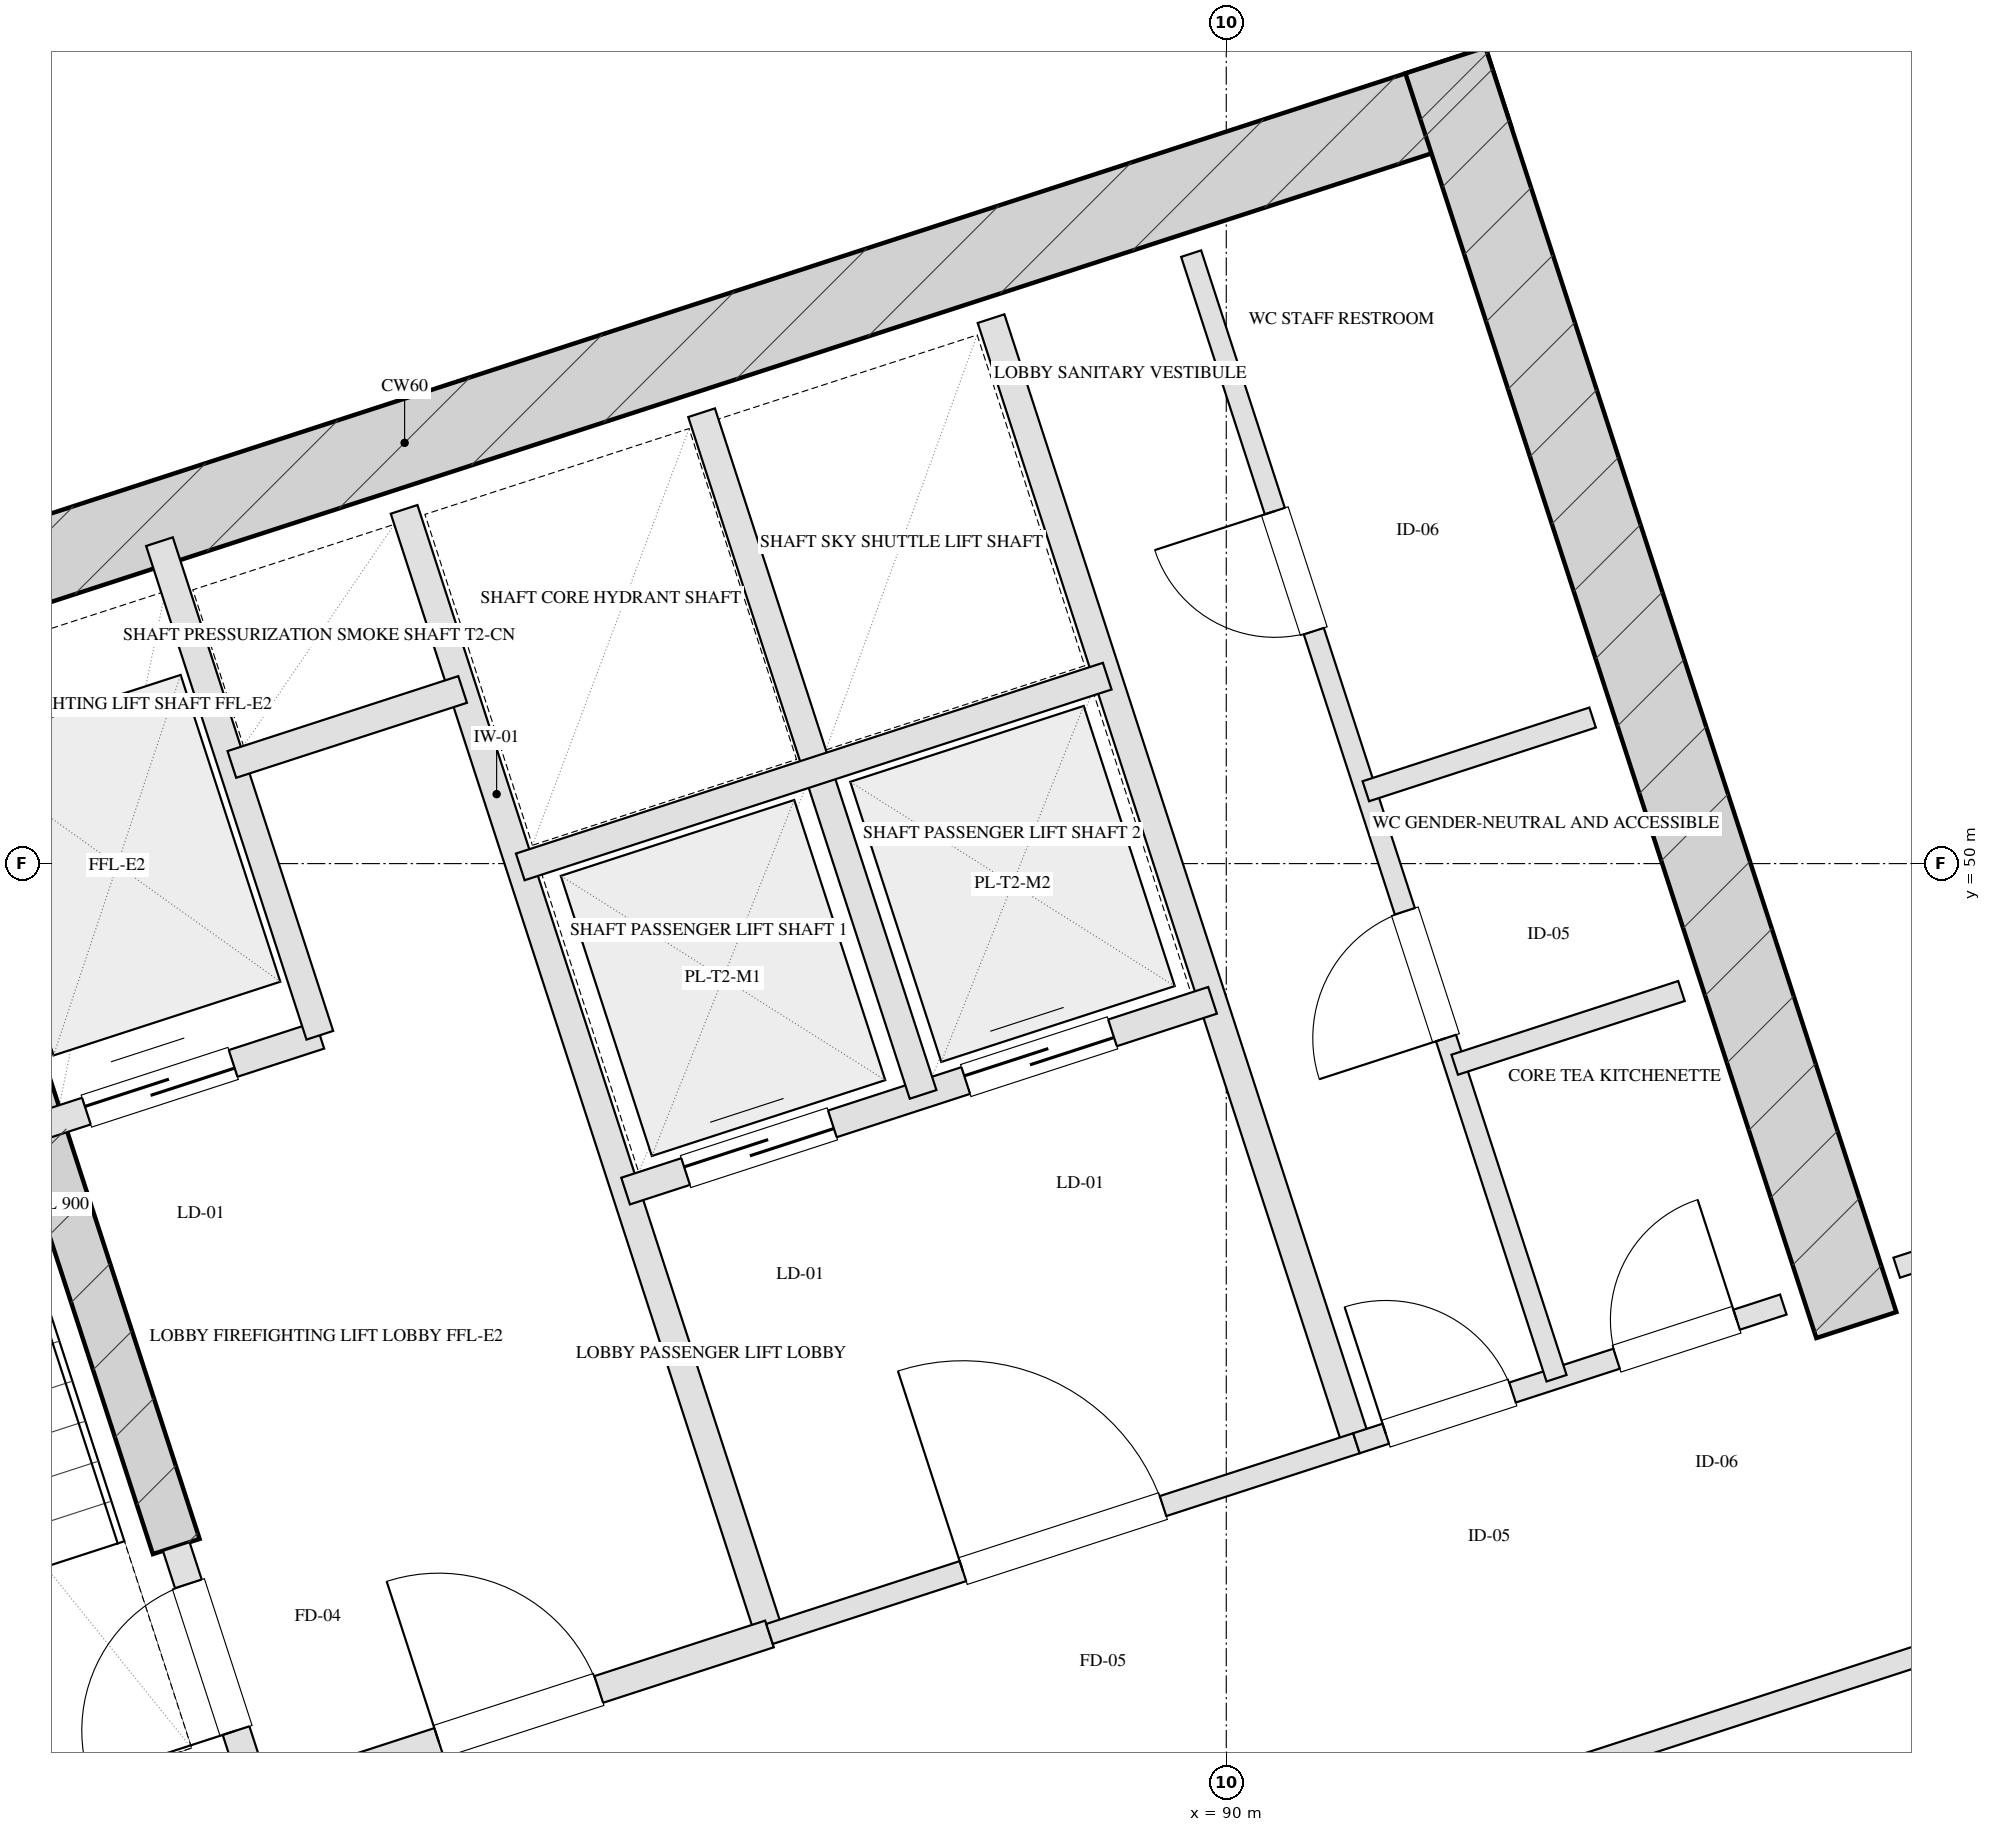
"""IFC4 building model, lengths in metres.
Left out: names, types, materials, properties, quantities, classifications, styles, units other than length and angle.
Written with IfcOpenShell. Run it as: python <this file> out.ifc"""

import sys

from ifc_helpers import new_model, si_unit, direction, frame, frame_2d, origin, place, context, subcontext, project, spatial, rectangle, extrude, element, fill, save


model = new_model("IFC4")
c1 = context("Model", 3, precision=1e-05, world=origin(), true_north=direction((0.0, 1.0)))
c2 = subcontext(c1, "Body", "Model", "MODEL_VIEW")
j1 = project(units=[si_unit("LENGTHUNIT", "METRE"), si_unit("PLANEANGLEUNIT", "RADIAN")], contexts=[c1])
p1 = place(None, origin())
s1 = spatial("IfcSite", under=j1, at=p1, CompositionType="ELEMENT")
p2 = place(p1, origin())
s2 = spatial("IfcBuilding", under=s1, at=p2, CompositionType="ELEMENT")
p3 = place(p2, frame((0.0, 0.0, 96.6)))
s3 = spatial("IfcBuildingStorey", under=s2, at=p3, CompositionType="ELEMENT", Elevation=96.6)
p4 = place(p3, frame((76.344, 50.466, 0.0), z_axis=(0.0, 0.0, 1.0), x_axis=(0.951055727519, 0.309019421968, 0.0)))
e1 = element("IfcWall", 1, at=p4, inside=s3, PredefinedType="SHEAR", context=c2, shape_type="SweptSolid", body=[
    extrude(rectangle(XDim=16.4, YDim=0.6, at=frame_2d((8.2, 0.0))), origin(), (0.0, 0.0, 1.0), 3.45),
])
p5 = place(p3, frame((94.492, 46.71, 0.0), z_axis=(0.0, 0.0, 1.0), x_axis=(-0.309010370028, 0.95105866865, 0.0)))
e2 = element("IfcWall", 2, at=p5, inside=s3, PredefinedType="SHEAR", context=c2, shape_type="SweptSolid", body=[
    extrude(rectangle(XDim=9.48, YDim=0.6, at=frame_2d((4.74, 0.0))), origin(), (0.0, 0.0, 1.0), 3.45),
])
p6 = place(p3, frame((82.514, 45.131, 0.0), z_axis=(0.0, 0.0, 1.0), x_axis=(-0.308988790936, 0.951065679686, 0.0)))
e3 = element("IfcWall", 3, at=p6, inside=s3, PredefinedType="SHEAR", context=c2, shape_type="SweptSolid", body=[
    extrude(rectangle(XDim=6.98, YDim=0.35, at=frame_2d((3.49, 0.0))), origin(), (0.0, 0.0, 1.0), 3.45),
])
p7 = place(p3, frame((68.047, 53.995, 0.0), z_axis=(0.0, 0.0, 1.0), x_axis=(0.95105505922, 0.309021478754, 0.0)))
e4 = element("IfcWall", 4, at=p7, inside=s3, PredefinedType="SOLIDWALL", context=c2, shape_type="SweptSolid", body=[
    extrude(rectangle(XDim=29.4, YDim=0.4, at=frame_2d((14.7, 0.0))), origin(), (0.0, 0.0, 1.0), 2.55),
])
p8 = place(p3, frame((83.101, 43.324, 0.0), z_axis=(0.0, 0.0, 1.0), x_axis=(-0.309048298632, 0.951046344356, 0.0)))
e5 = element("IfcWall", 5, at=p8, inside=s3, PredefinedType="PARTITIONING", context=c2, shape_type="SweptSolid", body=[
    extrude(rectangle(XDim=1.9, YDim=0.2, at=frame_2d((0.95, 0.0))), origin(), (0.0, 0.0, 1.0), 3.155),
])
p9 = place(p8, frame((0.52, 0.0, 0.0)))
e6 = element("IfcOpeningElement", 6, at=p9, cuts=e5, PredefinedType="OPENING", context=c2, shape_type="SweptSolid", body=[
    extrude(rectangle(XDim=1.1, YDim=2.05, at=frame_2d((0.55, 1.025))), frame((0.0, 0.11, 0.0), z_axis=(0.0, -1.0, 0.0), x_axis=(1.0, 0.0, 0.0)), (0.0, 0.0, 1.0), 0.22),
])
p10 = place(p3, frame((86.743, 44.508, 0.0), z_axis=(0.0, 0.0, 1.0), x_axis=(-0.309016001439, 0.951056838919, 0.0)))
e7 = element("IfcWall", 7, at=p10, inside=s3, PredefinedType="PARTITIONING", context=c2, shape_type="SweptSolid", body=[
    extrude(rectangle(XDim=8.43, YDim=0.2, at=frame_2d((4.215, 0.0))), origin(), (0.0, 0.0, 1.0), 3.155),
])
p11 = place(p3, frame((83.101, 43.324, 0.0), z_axis=(0.0, 0.0, 1.0), x_axis=(0.951052804469, 0.309028417967, 0.0)))
e8 = element("IfcWall", 8, at=p11, inside=s3, PredefinedType="PARTITIONING", context=c2, shape_type="SweptSolid", body=[
    extrude(rectangle(XDim=3.83, YDim=0.2, at=frame_2d((1.915, 0.0))), origin(), (0.0, 0.0, 1.0), 3.155),
])
p12 = place(p11, frame((1.35, 0.0, 0.0)))
e9 = element("IfcOpeningElement", 9, at=p12, cuts=e8, PredefinedType="OPENING", context=c2, shape_type="SweptSolid", body=[
    extrude(rectangle(XDim=1.2, YDim=2.05, at=frame_2d((0.6, 1.025))), frame((0.0, 0.11, 0.0), z_axis=(0.0, -1.0, 0.0), x_axis=(1.0, 0.0, 0.0)), (0.0, 0.0, 1.0), 0.22),
])
p13 = place(p3, frame((81.54, 48.127, 0.0), z_axis=(0.0, 0.0, 1.0), x_axis=(0.951062257173, 0.308999325213, 0.0)))
e10 = element("IfcWall", 10, at=p13, inside=s3, PredefinedType="PARTITIONING", context=c2, shape_type="SweptSolid", body=[
    extrude(rectangle(XDim=2.1, YDim=0.2, at=frame_2d((1.05, 0.0))), origin(), (0.0, 0.0, 1.0), 3.155),
])
p14 = place(p13, frame((0.35, 0.0, 0.0)))
e11 = element("IfcOpeningElement", 11, at=p14, cuts=e10, PredefinedType="OPENING", context=c2, shape_type="SweptSolid", body=[
    extrude(rectangle(XDim=1.1, YDim=2.05, at=frame_2d((0.55, 1.025))), frame((0.0, 0.11, 0.0), z_axis=(0.0, -1.0, 0.0), x_axis=(1.0, 0.0, 0.0)), (0.0, 0.0, 1.0), 0.22),
])
p15 = place(p3, frame((83.538, 48.776, 0.0), z_axis=(0.0, 0.0, 1.0), x_axis=(-0.3089935693, 0.951064127245, 0.0)))
e12 = element("IfcWall", 12, at=p15, inside=s3, PredefinedType="PARTITIONING", context=c2, shape_type="SweptSolid", body=[
    extrude(rectangle(XDim=3.7, YDim=0.2, at=frame_2d((1.85, 0.0))), origin(), (0.0, 0.0, 1.0), 3.155),
])
p16 = place(p3, frame((82.91, 50.707, 0.0), z_axis=(0.0, 0.0, 1.0), x_axis=(0.951041328149, 0.309063734775, 0.0)))
e13 = element("IfcWall", 13, at=p16, inside=s3, PredefinedType="PARTITIONING", context=c2, shape_type="SweptSolid", body=[
    extrude(rectangle(XDim=1.73, YDim=0.2, at=frame_2d((0.865, 0.0))), origin(), (0.0, 0.0, 1.0), 3.155),
])
p17 = place(p3, frame((90.928, 45.868, 0.0), z_axis=(0.0, 0.0, 1.0), x_axis=(-0.309042196757, 0.951048327176, 0.0)))
e14 = element("IfcWall", 14, at=p17, inside=s3, PredefinedType="PARTITIONING", context=c2, shape_type="SweptSolid", body=[
    extrude(rectangle(XDim=8.43, YDim=0.2, at=frame_2d((4.215, 0.0))), origin(), (0.0, 0.0, 1.0), 3.155),
])
p18 = place(p3, frame((86.743, 44.508, 0.0), z_axis=(0.0, 0.0, 1.0), x_axis=(0.951063829732, 0.308994485023, 0.0)))
e15 = element("IfcWall", 15, at=p18, inside=s3, PredefinedType="PARTITIONING", context=c2, shape_type="SweptSolid", body=[
    extrude(rectangle(XDim=4.4, YDim=0.15, at=frame_2d((2.2, 0.0))), origin(), (0.0, 0.0, 1.0), 3.155),
])
p19 = place(p18, frame((1.45, 0.0, 0.0)))
e16 = element("IfcOpeningElement", 16, at=p19, cuts=e15, PredefinedType="OPENING", context=c2, shape_type="SweptSolid", body=[
    extrude(rectangle(XDim=1.5, YDim=2.05, at=frame_2d((0.75, 1.025))), frame((0.0, 0.085, 0.0), z_axis=(0.0, -1.0, 0.0), x_axis=(1.0, 0.0, 0.0)), (0.0, 0.0, 1.0), 0.17),
])
p20 = place(p3, frame((85.718, 47.666, 0.0), z_axis=(0.0, 0.0, 1.0), x_axis=(0.951058531764, 0.30901079133, 0.0)))
e17 = element("IfcWall", 17, at=p20, inside=s3, PredefinedType="PARTITIONING", context=c2, shape_type="SweptSolid", body=[
    extrude(rectangle(XDim=4.4, YDim=0.2, at=frame_2d((2.2, 0.0))), origin(), (0.0, 0.0, 1.0), 3.155),
])
p21 = place(p20, frame((0.45, 0.0, 0.0)))
e18 = element("IfcOpeningElement", 18, at=p21, cuts=e17, PredefinedType="OPENING", context=c2, shape_type="SweptSolid", body=[
    extrude(rectangle(XDim=1.1, YDim=2.05, at=frame_2d((0.55, 1.025))), frame((0.0, 0.11, 0.0), z_axis=(0.0, -1.0, 0.0), x_axis=(1.0, 0.0, 0.0)), (0.0, 0.0, 1.0), 0.22),
])
p22 = place(p20, frame((2.55, 0.0, 0.0)))
e19 = element("IfcOpeningElement", 19, at=p22, cuts=e17, PredefinedType="OPENING", context=c2, shape_type="SweptSolid", body=[
    extrude(rectangle(XDim=1.1, YDim=2.05, at=frame_2d((0.55, 1.025))), frame((0.0, 0.11, 0.0), z_axis=(0.0, -1.0, 0.0), x_axis=(1.0, 0.0, 0.0)), (0.0, 0.0, 1.0), 0.22),
])
p23 = place(p3, frame((87.838, 48.354, 0.0), z_axis=(0.0, 0.0, 1.0), x_axis=(-0.3090093719, 0.951058992953, 0.0)))
e20 = element("IfcWall", 20, at=p23, inside=s3, PredefinedType="PARTITIONING", context=c2, shape_type="SweptSolid", body=[
    extrude(rectangle(XDim=5.11, YDim=0.2, at=frame_2d((2.555, 0.0))), origin(), (0.0, 0.0, 1.0), 3.155),
])
p24 = place(p3, frame((84.967, 49.977, 0.0), z_axis=(0.0, 0.0, 1.0), x_axis=(0.951063829732, 0.308994485023, 0.0)))
e21 = element("IfcWall", 21, at=p24, inside=s3, PredefinedType="PARTITIONING", context=c2, shape_type="SweptSolid", body=[
    extrude(rectangle(XDim=4.4, YDim=0.2, at=frame_2d((2.2, 0.0))), origin(), (0.0, 0.0, 1.0), 3.155),
])
p25 = place(p3, frame((90.928, 45.868, 0.0), z_axis=(0.0, 0.0, 1.0), x_axis=(0.951059297078, 0.309008435874, 0.0)))
e22 = element("IfcWall", 22, at=p25, inside=s3, PredefinedType="PARTITIONING", context=c2, shape_type="SweptSolid", body=[
    extrude(rectangle(XDim=3.2, YDim=0.15, at=frame_2d((1.6, 0.0))), origin(), (0.0, 0.0, 1.0), 3.155),
])
p26 = place(p25, frame((0.22, 0.0, 0.0)))
e23 = element("IfcOpeningElement", 23, at=p26, cuts=e22, PredefinedType="OPENING", context=c2, shape_type="SweptSolid", body=[
    extrude(rectangle(XDim=0.95, YDim=2.05, at=frame_2d((0.475, 1.025))), frame((0.0, 0.085, 0.0), z_axis=(0.0, -1.0, 0.0), x_axis=(1.0, 0.0, 0.0)), (0.0, 0.0, 1.0), 0.17),
])
p27 = place(p25, frame((1.95, 0.0, 0.0)))
e24 = element("IfcOpeningElement", 24, at=p27, cuts=e22, PredefinedType="OPENING", context=c2, shape_type="SweptSolid", body=[
    extrude(rectangle(XDim=0.9, YDim=2.05, at=frame_2d((0.45, 1.025))), frame((0.0, 0.085, 0.0), z_axis=(0.0, -1.0, 0.0), x_axis=(1.0, 0.0, 0.0)), (0.0, 0.0, 1.0), 0.17),
])
p28 = place(p3, frame((92.355, 46.331, 0.0), z_axis=(0.0, 0.0, 1.0), x_axis=(-0.309007490203, 0.951059604335, 0.0)))
e25 = element("IfcWall", 25, at=p28, inside=s3, PredefinedType="PARTITIONING", context=c2, shape_type="SweptSolid", body=[
    extrude(rectangle(XDim=8.43, YDim=0.15, at=frame_2d((4.215, 0.0))), origin(), (0.0, 0.0, 1.0), 3.155),
])
p29 = place(p28, frame((2.55, 0.0, 0.0)))
e26 = element("IfcOpeningElement", 26, at=p29, cuts=e25, PredefinedType="OPENING", context=c2, shape_type="SweptSolid", body=[
    extrude(rectangle(XDim=0.95, YDim=2.05, at=frame_2d((0.475, 1.025))), frame((0.0, 0.085, 0.0), z_axis=(0.0, -1.0, 0.0), x_axis=(1.0, 0.0, 0.0)), (0.0, 0.0, 1.0), 0.17),
])
p30 = place(p28, frame((5.6, 0.0, 0.0)))
e27 = element("IfcOpeningElement", 27, at=p30, cuts=e25, PredefinedType="OPENING", context=c2, shape_type="SweptSolid", body=[
    extrude(rectangle(XDim=0.9, YDim=2.05, at=frame_2d((0.45, 1.025))), frame((0.0, 0.085, 0.0), z_axis=(0.0, -1.0, 0.0), x_axis=(1.0, 0.0, 0.0)), (0.0, 0.0, 1.0), 0.17),
])
p31 = place(p3, frame((90.995, 50.516, 0.0), z_axis=(0.0, 0.0, 1.0), x_axis=(0.951040401051, 0.309066587596, 0.0)))
e28 = element("IfcWall", 28, at=p31, inside=s3, PredefinedType="PARTITIONING", context=c2, shape_type="SweptSolid", body=[
    extrude(rectangle(XDim=1.7, YDim=0.15, at=frame_2d((0.85, 0.0))), origin(), (0.0, 0.0, 1.0), 3.155),
])
p32 = place(p3, frame((91.628, 48.566, 0.0), z_axis=(0.0, 0.0, 1.0), x_axis=(0.951054116971, 0.309024378638, 0.0)))
e29 = element("IfcWall", 29, at=p32, inside=s3, PredefinedType="PARTITIONING", context=c2, shape_type="SweptSolid", body=[
    extrude(rectangle(XDim=1.7, YDim=0.15, at=frame_2d((0.85, 0.0))), origin(), (0.0, 0.0, 1.0), 3.155),
])
p33 = place(p3, frame((94.78, 47.119, 0.0), z_axis=(0.0, 0.0, 1.0), x_axis=(0.951054329824, 0.309023723562, 0.0)))
e30 = element("IfcWall", 30, at=p33, inside=s3, PredefinedType="PARTITIONING", context=c2, shape_type="SweptSolid", body=[
    extrude(rectangle(XDim=8.5, YDim=0.15, at=frame_2d((4.25, 0.0))), origin(), (0.0, 0.0, 1.0), 3.155),
])
p34 = place(p33, frame((3.57, 0.0, 0.0)))
e31 = element("IfcOpeningElement", 31, at=p34, cuts=e30, PredefinedType="OPENING", context=c2, shape_type="SweptSolid", body=[
    extrude(rectangle(XDim=1.0, YDim=2.05, at=frame_2d((0.5, 1.025))), frame((0.0, 0.085, 0.0), z_axis=(0.0, -1.0, 0.0), x_axis=(1.0, 0.0, 0.0)), (0.0, 0.0, 1.0), 0.17),
])
p35 = place(p3, frame((90.567, 42.933, 0.0), z_axis=(0.0, 0.0, 1.0), x_axis=(0.951058377365, 0.309011266531, 0.0)))
e32 = element("IfcWall", 32, at=p35, inside=s3, PredefinedType="PARTITIONING", context=c2, shape_type="SweptSolid", body=[
    extrude(rectangle(XDim=13.8, YDim=0.15, at=frame_2d((6.9, 0.0))), origin(), (0.0, 0.0, 1.0), 3.155),
])
p36 = place(p3, frame((91.594, 39.775, 0.0), z_axis=(0.0, 0.0, 1.0), x_axis=(0.951056688031, 0.309016465825, 0.0)))
e33 = element("IfcWall", 33, at=p36, inside=s3, PredefinedType="PARTITIONING", context=c2, shape_type="SweptSolid", body=[
    extrude(rectangle(XDim=13.8, YDim=0.15, at=frame_2d((6.9, 0.0))), origin(), (0.0, 0.0, 1.0), 3.155),
])
p37 = place(p9, origin())
e34 = element("IfcDoor", 34, at=p37, inside=s3, OperationType="SINGLE_SWING_LEFT", PredefinedType="DOOR", context=c2, shape_type="SweptSolid", body=[
    extrude(rectangle(XDim=1.1, YDim=2.05, at=frame_2d((0.55, 1.025))), frame((0.0, 0.025, 0.0), z_axis=(0.0, -1.0, 0.0), x_axis=(1.0, 0.0, 0.0)), (0.0, 0.0, 1.0), 0.05),
])
fill(e6, e34)
p38 = place(p12, origin())
e35 = element("IfcDoor", 35, at=p38, inside=s3, OperationType="SINGLE_SWING_LEFT", PredefinedType="DOOR", context=c2, shape_type="SweptSolid", body=[
    extrude(rectangle(XDim=1.2, YDim=2.05, at=frame_2d((0.6, 1.025))), frame((0.0, 0.025, 0.0), z_axis=(0.0, -1.0, 0.0), x_axis=(1.0, 0.0, 0.0)), (0.0, 0.0, 1.0), 0.05),
])
fill(e9, e35)
p39 = place(p14, origin())
e36 = element("IfcDoor", 36, at=p39, inside=s3, OperationType="DOUBLE_DOOR_SLIDING", PredefinedType="DOOR", context=c2, shape_type="SweptSolid", body=[
    extrude(rectangle(XDim=1.1, YDim=2.05, at=frame_2d((0.55, 1.025))), frame((0.0, 0.025, 0.0), z_axis=(0.0, -1.0, 0.0), x_axis=(1.0, 0.0, 0.0)), (0.0, 0.0, 1.0), 0.05),
])
fill(e11, e36)
p40 = place(p19, origin())
e37 = element("IfcDoor", 37, at=p40, inside=s3, OperationType="SINGLE_SWING_LEFT", PredefinedType="DOOR", context=c2, shape_type="SweptSolid", body=[
    extrude(rectangle(XDim=1.5, YDim=2.05, at=frame_2d((0.75, 1.025))), frame((0.0, 0.025, 0.0), z_axis=(0.0, -1.0, 0.0), x_axis=(1.0, 0.0, 0.0)), (0.0, 0.0, 1.0), 0.05),
])
fill(e16, e37)
p41 = place(p21, origin())
e38 = element("IfcDoor", 38, at=p41, inside=s3, OperationType="DOUBLE_DOOR_SLIDING", PredefinedType="DOOR", context=c2, shape_type="SweptSolid", body=[
    extrude(rectangle(XDim=1.1, YDim=2.05, at=frame_2d((0.55, 1.025))), frame((0.0, 0.025, 0.0), z_axis=(0.0, -1.0, 0.0), x_axis=(1.0, 0.0, 0.0)), (0.0, 0.0, 1.0), 0.05),
])
fill(e18, e38)
p42 = place(p22, origin())
e39 = element("IfcDoor", 39, at=p42, inside=s3, OperationType="DOUBLE_DOOR_SLIDING", PredefinedType="DOOR", context=c2, shape_type="SweptSolid", body=[
    extrude(rectangle(XDim=1.1, YDim=2.05, at=frame_2d((0.55, 1.025))), frame((0.0, 0.025, 0.0), z_axis=(0.0, -1.0, 0.0), x_axis=(1.0, 0.0, 0.0)), (0.0, 0.0, 1.0), 0.05),
])
fill(e19, e39)
p43 = place(p26, origin())
e40 = element("IfcDoor", 40, at=p43, inside=s3, OperationType="SINGLE_SWING_LEFT", PredefinedType="DOOR", context=c2, shape_type="SweptSolid", body=[
    extrude(rectangle(XDim=0.95, YDim=2.05, at=frame_2d((0.475, 1.025))), frame((0.0, 0.025, 0.0), z_axis=(0.0, -1.0, 0.0), x_axis=(1.0, 0.0, 0.0)), (0.0, 0.0, 1.0), 0.05),
])
fill(e23, e40)
p44 = place(p27, origin())
e41 = element("IfcDoor", 41, at=p44, inside=s3, OperationType="SINGLE_SWING_RIGHT", PredefinedType="DOOR", context=c2, shape_type="SweptSolid", body=[
    extrude(rectangle(XDim=0.9, YDim=2.05, at=frame_2d((0.45, 1.025))), frame((0.0, 0.025, 0.0), z_axis=(0.0, -1.0, 0.0), x_axis=(1.0, 0.0, 0.0)), (0.0, 0.0, 1.0), 0.05),
])
fill(e24, e41)
p45 = place(p29, origin())
e42 = element("IfcDoor", 42, at=p45, inside=s3, OperationType="SINGLE_SWING_LEFT", PredefinedType="DOOR", context=c2, shape_type="SweptSolid", body=[
    extrude(rectangle(XDim=0.95, YDim=2.05, at=frame_2d((0.475, 1.025))), frame((0.0, 0.025, 0.0), z_axis=(0.0, -1.0, 0.0), x_axis=(1.0, 0.0, 0.0)), (0.0, 0.0, 1.0), 0.05),
])
fill(e26, e42)
p46 = place(p30, origin())
e43 = element("IfcDoor", 43, at=p46, inside=s3, OperationType="SINGLE_SWING_RIGHT", PredefinedType="DOOR", context=c2, shape_type="SweptSolid", body=[
    extrude(rectangle(XDim=0.9, YDim=2.05, at=frame_2d((0.45, 1.025))), frame((0.0, 0.025, 0.0), z_axis=(0.0, -1.0, 0.0), x_axis=(1.0, 0.0, 0.0)), (0.0, 0.0, 1.0), 0.05),
])
fill(e27, e43)
save(model, sys.argv[1])
